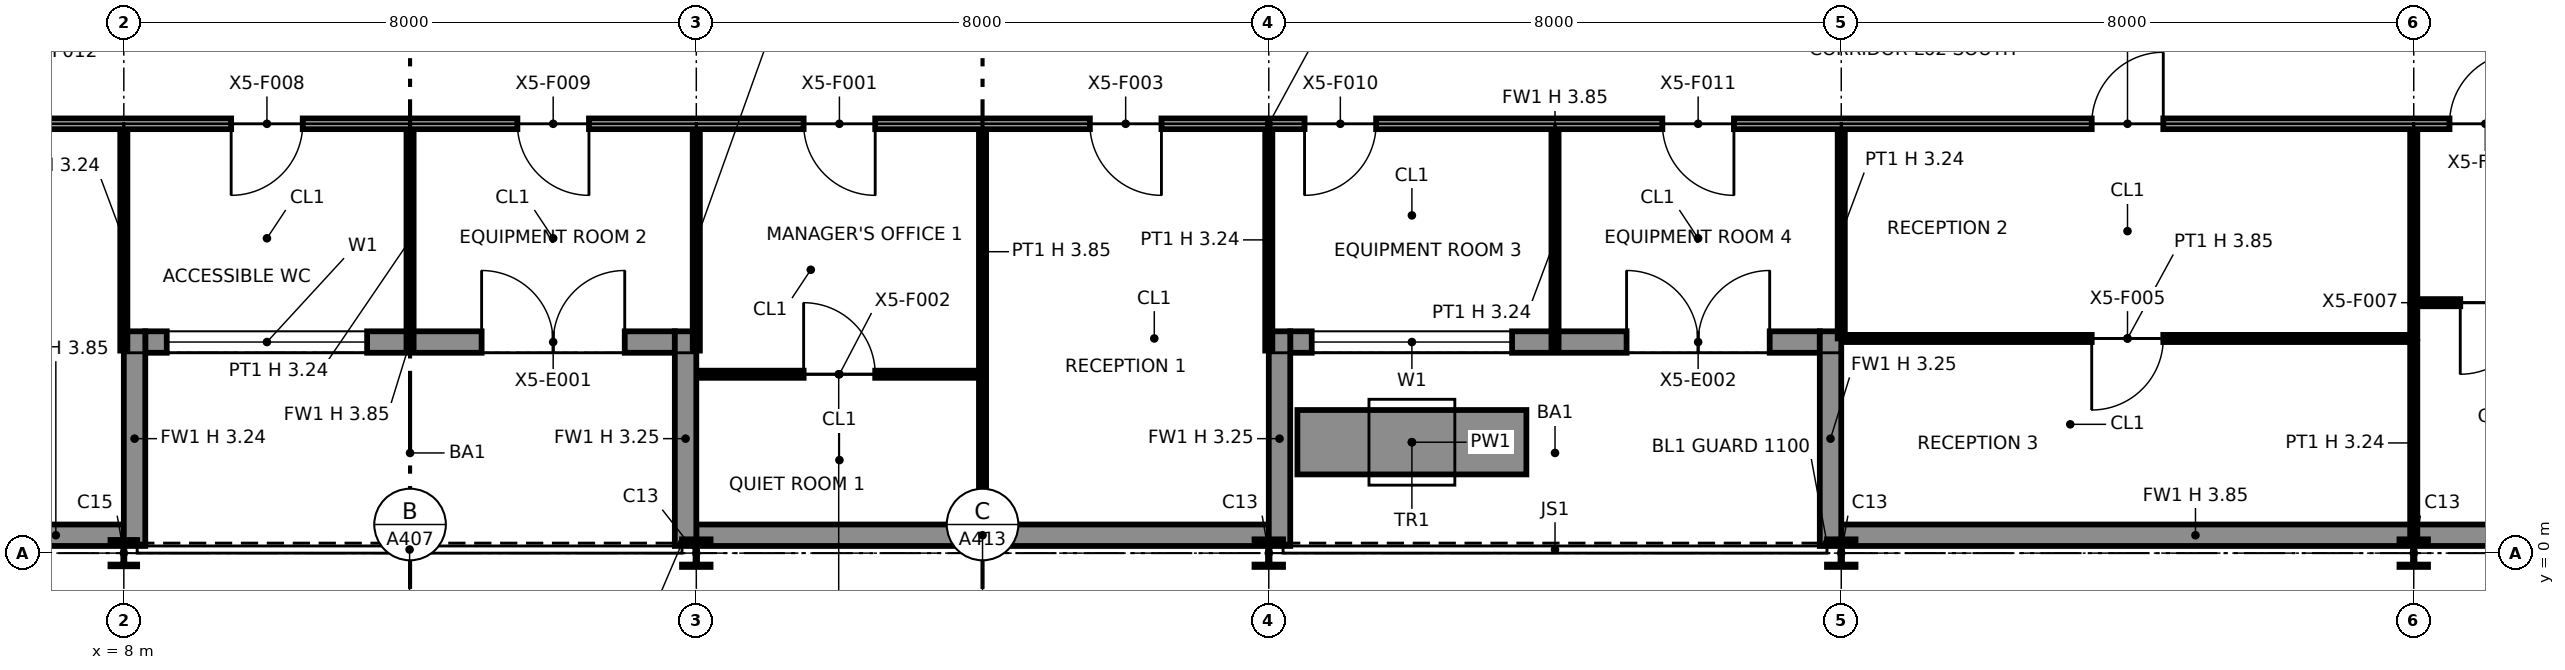
"""IFC4 building model, lengths in metres.
Left out: names, types, materials, properties, quantities, classifications, styles, units other than length and angle.
Written with IfcOpenShell. Run it as: python <this file> out.ifc"""

import sys

from ifc_helpers import new_model, si_unit, direction, frame, frame_2d, origin, origin_2d, place, context, subcontext, project, spatial, polyline, rectangle, i_section, outline, extrude, element, fill, save


model = new_model("IFC4")
c1 = context("Model", 3, precision=1e-05, world=origin(), true_north=direction((0.0, 1.0)))
c2 = subcontext(c1, "Body", "Model", "MODEL_VIEW")
j1 = project(units=[si_unit("LENGTHUNIT", "METRE"), si_unit("PLANEANGLEUNIT", "RADIAN")], contexts=[c1])
p1 = place(None, origin())
s1 = spatial("IfcSite", under=j1, at=p1, CompositionType="ELEMENT")
p2 = place(p1, origin())
s2 = spatial("IfcBuilding", under=s1, at=p2, CompositionType="ELEMENT")
p3 = place(p2, frame((0.0, 0.0, 283.0)))
s3 = spatial("IfcBuildingStorey", under=s2, at=p3, CompositionType="ELEMENT", Elevation=283.0)
p4 = place(p3, frame((8.0, 0.0, 0.0), z_axis=(0.0, 0.0, 1.0), x_axis=(1.0, 0.0, 0.0)))
e1 = element("IfcColumn", 1, at=p4, inside=s3, PredefinedType="COLUMN", context=c2, shape_type="SweptSolid", body=[
    extrude(i_section(OverallWidth=0.373, OverallDepth=0.368, WebThickness=0.015, FlangeThickness=0.024, at=origin_2d()), origin(), (0.0, 0.0, 1.0), 3.85),
])
for number, where, z_axis, x_axis in (
    (2, (16.0, 0.0, 0.0), (0.0, 0.0, 1.0), (1.0, 0.0, 0.0)),
    (3, (24.0, 0.0, 0.0), (0.0, 0.0, 1.0), (1.0, 0.0, 0.0)),
    (4, (32.0, 0.0, 0.0), (0.0, 0.0, 1.0), (1.0, 0.0, 0.0)),
    (5, (40.0, 0.0, 0.0), (0.0, 0.0, 1.0), (1.0, 0.0, 0.0)),
):
    element("IfcColumn", number, at=place(p3, frame(where, z_axis=z_axis, x_axis=x_axis)), inside=s3, PredefinedType="COLUMN", context=c2, shape_type="SweptSolid", body=[
        extrude(i_section(OverallWidth=0.399, OverallDepth=0.386, WebThickness=0.021, FlangeThickness=0.033, at=origin_2d()), origin(), (0.0, 0.0, 1.0), 3.85),
    ])
p5 = place(p3, frame((6.1, 0.25, 0.0), z_axis=(0.0, 0.0, 1.0), x_axis=(1.0, 0.0, 0.0)))
e6 = element("IfcWall", 6, at=p5, inside=s3, PredefinedType="SOLIDWALL", context=c2, shape_type="SweptSolid", body=[
    extrude(rectangle(XDim=1.9, YDim=0.3, at=frame_2d((0.95, 0.0))), origin(), (0.0, 0.0, 1.0), 3.85),
])
p6 = place(p3, frame((8.3, 2.95, 0.0), z_axis=(0.0, 0.0, 1.0), x_axis=(1.0, 0.0, 0.0)))
e7 = element("IfcWall", 7, at=p6, inside=s3, PredefinedType="SOLIDWALL", context=c2, shape_type="SweptSolid", body=[
    extrude(rectangle(XDim=7.4, YDim=0.3, at=frame_2d((3.7, 0.0))), origin(), (0.0, 0.0, 1.0), 3.85),
])
p7 = place(p6, frame((0.3, 0.0, 0.9)))
e8 = element("IfcOpeningElement", 8, at=p7, cuts=e7, PredefinedType="OPENING", context=c2, shape_type="SweptSolid", body=[
    extrude(rectangle(XDim=2.8, YDim=2.2, at=frame_2d((1.4, 1.1))), frame((0.0, 0.16, 0.0), z_axis=(0.0, -1.0, 0.0), x_axis=(1.0, 0.0, 0.0)), (0.0, 0.0, 1.0), 0.32),
])
p8 = place(p6, frame((4.7, 0.0, 0.0)))
e9 = element("IfcOpeningElement", 9, at=p8, cuts=e7, PredefinedType="OPENING", context=c2, shape_type="SweptSolid", body=[
    extrude(rectangle(XDim=2.0, YDim=2.4, at=frame_2d((1.0, 1.2))), frame((0.0, 0.16, 0.0), z_axis=(0.0, -1.0, 0.0), x_axis=(1.0, 0.0, 0.0)), (0.0, 0.0, 1.0), 0.32),
])
p9 = place(p3, frame((8.15, 0.1, 0.0), z_axis=(0.0, 0.0, 1.0), x_axis=(0.0, 1.0, 0.0)))
e10 = element("IfcWall", 10, at=p9, inside=s3, PredefinedType="SOLIDWALL", context=c2, shape_type="SweptSolid", body=[
    extrude(rectangle(XDim=3.0, YDim=0.3, at=frame_2d((1.5, 0.0))), origin(), (0.0, 0.0, 1.0), 3.237),
])
p10 = place(p3, frame((15.85, 0.1, 0.0), z_axis=(0.0, 0.0, 1.0), x_axis=(0.0, 1.0, 0.0)))
e11 = element("IfcWall", 11, at=p10, inside=s3, PredefinedType="SOLIDWALL", context=c2, shape_type="SweptSolid", body=[
    extrude(rectangle(XDim=3.0, YDim=0.3, at=frame_2d((1.5, 0.0))), origin(), (0.0, 0.0, 1.0), 3.247),
])
p11 = place(p3, frame((16.0, 0.25, 0.0), z_axis=(0.0, 0.0, 1.0), x_axis=(1.0, 0.0, 0.0)))
e12 = element("IfcWall", 12, at=p11, inside=s3, PredefinedType="SOLIDWALL", context=c2, shape_type="SweptSolid", body=[
    extrude(rectangle(XDim=8.0, YDim=0.3, at=frame_2d((4.0, 0.0))), origin(), (0.0, 0.0, 1.0), 3.85),
])
p12 = place(p3, frame((24.3, 2.95, 0.0), z_axis=(0.0, 0.0, 1.0), x_axis=(1.0, 0.0, 0.0)))
e13 = element("IfcWall", 13, at=p12, inside=s3, PredefinedType="SOLIDWALL", context=c2, shape_type="SweptSolid", body=[
    extrude(rectangle(XDim=7.4, YDim=0.3, at=frame_2d((3.7, 0.0))), origin(), (0.0, 0.0, 1.0), 3.85),
])
p13 = place(p12, frame((0.3, 0.0, 0.9)))
e14 = element("IfcOpeningElement", 14, at=p13, cuts=e13, PredefinedType="OPENING", context=c2, shape_type="SweptSolid", body=[
    extrude(rectangle(XDim=2.8, YDim=2.2, at=frame_2d((1.4, 1.1))), frame((0.0, 0.16, 0.0), z_axis=(0.0, -1.0, 0.0), x_axis=(1.0, 0.0, 0.0)), (0.0, 0.0, 1.0), 0.32),
])
p14 = place(p12, frame((4.7, 0.0, 0.0)))
e15 = element("IfcOpeningElement", 15, at=p14, cuts=e13, PredefinedType="OPENING", context=c2, shape_type="SweptSolid", body=[
    extrude(rectangle(XDim=2.0, YDim=2.4, at=frame_2d((1.0, 1.2))), frame((0.0, 0.16, 0.0), z_axis=(0.0, -1.0, 0.0), x_axis=(1.0, 0.0, 0.0)), (0.0, 0.0, 1.0), 0.32),
])
for number, where, z_axis, x_axis in (
    (16, (24.15, 0.1, 0.0), (0.0, 0.0, 1.0), (0.0, 1.0, 0.0)),
    (17, (31.85, 0.1, 0.0), (0.0, 0.0, 1.0), (0.0, 1.0, 0.0)),
):
    element("IfcWall", number, at=place(p3, frame(where, z_axis=z_axis, x_axis=x_axis)), inside=s3, PredefinedType="SOLIDWALL", context=c2, shape_type="SweptSolid", body=[
        extrude(rectangle(XDim=3.0, YDim=0.3, at=frame_2d((1.5, 0.0))), origin(), (0.0, 0.0, 1.0), 3.247),
    ])
p15 = place(p3, frame((32.0, 0.25, 0.0), z_axis=(0.0, 0.0, 1.0), x_axis=(1.0, 0.0, 0.0)))
e18 = element("IfcWall", 18, at=p15, inside=s3, PredefinedType="SOLIDWALL", context=c2, shape_type="SweptSolid", body=[
    extrude(rectangle(XDim=9.9, YDim=0.3, at=frame_2d((4.95, 0.0))), origin(), (0.0, 0.0, 1.0), 3.85),
])
p16 = place(p3, frame((24.4, 1.55, 0.0), z_axis=(0.0, 0.0, 1.0), x_axis=(1.0, 0.0, 0.0)))
e19 = element("IfcWall", 19, at=p16, inside=s3, PredefinedType="SOLIDWALL", context=c2, shape_type="SweptSolid", body=[
    extrude(rectangle(XDim=3.2, YDim=0.9, at=frame_2d((1.6, 0.0))), origin(), (0.0, 0.0, 1.0), 0.6),
])
p17 = place(p3, frame((20.0, 0.13, 0.0), z_axis=(0.0, 0.0, 1.0), x_axis=(0.0, 1.0, 0.0)))
e20 = element("IfcWall", 20, at=p17, inside=s3, PredefinedType="PARTITIONING", context=c2, shape_type="SweptSolid", body=[
    extrude(rectangle(XDim=2.32, YDim=0.1, at=frame_2d((1.16, 0.0))), origin(), (0.0, 0.0, 1.0), 3.85),
])
p18 = place(p3, frame((40.0, 0.13, 0.0), z_axis=(0.0, 0.0, 1.0), x_axis=(0.0, 1.0, 0.0)))
e21 = element("IfcWall", 21, at=p18, inside=s3, PredefinedType="PARTITIONING", context=c2, shape_type="SweptSolid", body=[
    extrude(rectangle(XDim=2.82, YDim=0.1, at=frame_2d((1.41, 0.0))), origin(), (0.0, 0.0, 1.0), 3.238),
])
p19 = place(p3, frame((16.03, 2.5, 0.0), z_axis=(0.0, 0.0, 1.0), x_axis=(1.0, 0.0, 0.0)))
e22 = element("IfcWall", 22, at=p19, inside=s3, PredefinedType="PARTITIONING", context=c2, shape_type="SweptSolid", body=[
    extrude(rectangle(XDim=3.92, YDim=0.1, at=frame_2d((1.96, 0.0))), origin(), (0.0, 0.0, 1.0), 3.85),
])
p20 = place(p19, frame((1.47, 0.0, 0.0)))
e23 = element("IfcOpeningElement", 23, at=p20, cuts=e22, PredefinedType="OPENING", context=c2, shape_type="SweptSolid", body=[
    extrude(rectangle(XDim=1.0, YDim=2.1, at=frame_2d((0.5, 1.05))), frame((0.0, 0.06, 0.0), z_axis=(0.0, -1.0, 0.0), x_axis=(1.0, 0.0, 0.0)), (0.0, 0.0, 1.0), 0.12),
])
p21 = place(p3, frame((20.0, 2.5, 0.0), z_axis=(0.0, 0.0, 1.0), x_axis=(0.0, 1.0, 0.0)))
e24 = element("IfcWall", 24, at=p21, inside=s3, PredefinedType="PARTITIONING", context=c2, shape_type="SweptSolid", body=[
    extrude(outline(polyline([(0.0, 0.0), (3.425, 0.0), (3.425, 3.85), (1.8, 3.85), (1.798, 3.238), (1.202, 3.238), (1.2, 3.85), (0.0, 3.85), (0.0, 0.0)])), frame((0.0, 0.05, 0.0), z_axis=(0.0, -1.0, 0.0), x_axis=(1.0, 0.0, 0.0)), (0.0, 0.0, 1.0), 0.1),
])
for number, where, z_axis, x_axis in (
    (25, (8.0, 2.83, 0.0), (0.0, 0.0, 1.0), (0.0, 1.0, 0.0)),
    (26, (12.0, 2.83, 0.0), (0.0, 0.0, 1.0), (0.0, 1.0, 0.0)),
    (27, (16.0, 2.83, 0.0), (0.0, 0.0, 1.0), (0.0, 1.0, 0.0)),
    (28, (24.0, 2.83, 0.0), (0.0, 0.0, 1.0), (0.0, 1.0, 0.0)),
    (29, (28.0, 2.83, 0.0), (0.0, 0.0, 1.0), (0.0, 1.0, 0.0)),
):
    element("IfcWall", number, at=place(p3, frame(where, z_axis=z_axis, x_axis=x_axis)), inside=s3, PredefinedType="PARTITIONING", context=c2, shape_type="SweptSolid", body=[
        extrude(rectangle(XDim=3.095, YDim=0.1, at=frame_2d((1.547, 0.0))), origin(), (0.0, 0.0, 1.0), 3.238),
    ])
p22 = place(p3, frame((32.05, 3.0, 0.0), z_axis=(0.0, 0.0, 1.0), x_axis=(1.0, 0.0, 0.0)))
e30 = element("IfcWall", 30, at=p22, inside=s3, PredefinedType="PARTITIONING", context=c2, shape_type="SweptSolid", body=[
    extrude(rectangle(XDim=7.9, YDim=0.1, at=frame_2d((3.95, 0.0))), origin(), (0.0, 0.0, 1.0), 3.85),
])
p23 = place(p22, frame((4.45, 0.0, 0.0), z_axis=(0.0, 0.0, 1.0), x_axis=(-1.0, 0.0, 0.0)))
e31 = element("IfcOpeningElement", 31, at=p23, cuts=e30, PredefinedType="OPENING", context=c2, shape_type="SweptSolid", body=[
    extrude(rectangle(XDim=1.0, YDim=2.1, at=frame_2d((0.5, 1.05))), frame((0.0, 0.06, 0.0), z_axis=(0.0, -1.0, 0.0), x_axis=(1.0, 0.0, 0.0)), (0.0, 0.0, 1.0), 0.12),
])
p24 = place(p3, frame((32.0, 3.0, 0.0), z_axis=(0.0, 0.0, 1.0), x_axis=(0.0, 1.0, 0.0)))
e32 = element("IfcWall", 32, at=p24, inside=s3, PredefinedType="PARTITIONING", context=c2, shape_type="SweptSolid", body=[
    extrude(rectangle(XDim=2.925, YDim=0.1, at=frame_2d((1.462, 0.0))), origin(), (0.0, 0.0, 1.0), 3.238),
])
p25 = place(p3, frame((40.0, 3.0, 0.0), z_axis=(0.0, 0.0, 1.0), x_axis=(0.0, 1.0, 0.0)))
e33 = element("IfcWall", 33, at=p25, inside=s3, PredefinedType="PARTITIONING", context=c2, shape_type="SweptSolid", body=[
    extrude(rectangle(XDim=0.45, YDim=0.1, at=frame_2d((0.225, 0.0))), origin(), (0.0, 0.0, 1.0), 3.238),
])
p26 = place(p3, frame((40.05, 3.5, 0.0), z_axis=(0.0, 0.0, 1.0), x_axis=(1.0, 0.0, 0.0)))
e34 = element("IfcWall", 34, at=p26, inside=s3, PredefinedType="PARTITIONING", context=c2, shape_type="SweptSolid", body=[
    extrude(rectangle(XDim=3.52, YDim=0.1, at=frame_2d((1.76, 0.0))), origin(), (0.0, 0.0, 1.0), 3.85),
])
p27 = place(p26, frame((1.6, 0.0, 0.0), z_axis=(0.0, 0.0, 1.0), x_axis=(-1.0, 0.0, 0.0)))
e35 = element("IfcOpeningElement", 35, at=p27, cuts=e34, PredefinedType="OPENING", context=c2, shape_type="SweptSolid", body=[
    extrude(rectangle(XDim=1.0, YDim=2.1, at=frame_2d((0.5, 1.05))), frame((0.0, 0.06, 0.0), z_axis=(0.0, -1.0, 0.0), x_axis=(1.0, 0.0, 0.0)), (0.0, 0.0, 1.0), 0.12),
])
p28 = place(p3, frame((40.0, 3.5, 0.0), z_axis=(0.0, 0.0, 1.0), x_axis=(0.0, 1.0, 0.0)))
e36 = element("IfcWall", 36, at=p28, inside=s3, PredefinedType="PARTITIONING", context=c2, shape_type="SweptSolid", body=[
    extrude(rectangle(XDim=2.425, YDim=0.1, at=frame_2d((1.212, 0.0))), origin(), (0.0, 0.0, 1.0), 3.238),
])
p29 = place(p3, frame((6.075, 6.0, 0.0), z_axis=(0.0, 0.0, 1.0), x_axis=(1.0, 0.0, 0.0)))
e37 = element("IfcWall", 37, at=p29, inside=s3, PredefinedType="PARTITIONING", context=c2, shape_type="SweptSolid", body=[
    extrude(rectangle(XDim=35.85, YDim=0.15, at=frame_2d((17.925, 0.0))), origin(), (0.0, 0.0, 1.0), 3.85),
])
p30 = place(p29, frame((12.425, 0.0, 0.0), z_axis=(0.0, 0.0, 1.0), x_axis=(-1.0, 0.0, 0.0)))
e38 = element("IfcOpeningElement", 38, at=p30, cuts=e37, PredefinedType="OPENING", context=c2, shape_type="SweptSolid", body=[
    extrude(rectangle(XDim=1.0, YDim=2.1, at=frame_2d((0.5, 1.05))), frame((0.0, 0.085, 0.0), z_axis=(0.0, -1.0, 0.0), x_axis=(1.0, 0.0, 0.0)), (0.0, 0.0, 1.0), 0.17),
])
p31 = place(p29, frame((16.425, 0.0, 0.0), z_axis=(0.0, 0.0, 1.0), x_axis=(-1.0, 0.0, 0.0)))
e39 = element("IfcOpeningElement", 39, at=p31, cuts=e37, PredefinedType="OPENING", context=c2, shape_type="SweptSolid", body=[
    extrude(rectangle(XDim=1.0, YDim=2.1, at=frame_2d((0.5, 1.05))), frame((0.0, 0.085, 0.0), z_axis=(0.0, -1.0, 0.0), x_axis=(1.0, 0.0, 0.0)), (0.0, 0.0, 1.0), 0.17),
])
p32 = place(p29, frame((29.425, 0.0, 0.0)))
e40 = element("IfcOpeningElement", 40, at=p32, cuts=e37, PredefinedType="OPENING", context=c2, shape_type="SweptSolid", body=[
    extrude(rectangle(XDim=1.0, YDim=2.1, at=frame_2d((0.5, 1.05))), frame((0.0, 0.085, 0.0), z_axis=(0.0, -1.0, 0.0), x_axis=(1.0, 0.0, 0.0)), (0.0, 0.0, 1.0), 0.17),
])
p33 = place(p29, frame((34.425, 0.0, 0.0)))
e41 = element("IfcOpeningElement", 41, at=p33, cuts=e37, PredefinedType="OPENING", context=c2, shape_type="SweptSolid", body=[
    extrude(rectangle(XDim=1.0, YDim=2.1, at=frame_2d((0.5, 1.05))), frame((0.0, 0.085, 0.0), z_axis=(0.0, -1.0, 0.0), x_axis=(1.0, 0.0, 0.0)), (0.0, 0.0, 1.0), 0.17),
])
p34 = place(p29, frame((4.425, 0.0, 0.0), z_axis=(0.0, 0.0, 1.0), x_axis=(-1.0, 0.0, 0.0)))
e42 = element("IfcOpeningElement", 42, at=p34, cuts=e37, PredefinedType="OPENING", context=c2, shape_type="SweptSolid", body=[
    extrude(rectangle(XDim=1.0, YDim=2.1, at=frame_2d((0.5, 1.05))), frame((0.0, 0.085, 0.0), z_axis=(0.0, -1.0, 0.0), x_axis=(1.0, 0.0, 0.0)), (0.0, 0.0, 1.0), 0.17),
])
p35 = place(p29, frame((8.425, 0.0, 0.0), z_axis=(0.0, 0.0, 1.0), x_axis=(-1.0, 0.0, 0.0)))
e43 = element("IfcOpeningElement", 43, at=p35, cuts=e37, PredefinedType="OPENING", context=c2, shape_type="SweptSolid", body=[
    extrude(rectangle(XDim=1.0, YDim=2.1, at=frame_2d((0.5, 1.05))), frame((0.0, 0.085, 0.0), z_axis=(0.0, -1.0, 0.0), x_axis=(1.0, 0.0, 0.0)), (0.0, 0.0, 1.0), 0.17),
])
p36 = place(p29, frame((19.425, 0.0, 0.0), z_axis=(0.0, 0.0, 1.0), x_axis=(-1.0, 0.0, 0.0)))
e44 = element("IfcOpeningElement", 44, at=p36, cuts=e37, PredefinedType="OPENING", context=c2, shape_type="SweptSolid", body=[
    extrude(rectangle(XDim=1.0, YDim=2.1, at=frame_2d((0.5, 1.05))), frame((0.0, 0.085, 0.0), z_axis=(0.0, -1.0, 0.0), x_axis=(1.0, 0.0, 0.0)), (0.0, 0.0, 1.0), 0.17),
])
p37 = place(p29, frame((24.425, 0.0, 0.0), z_axis=(0.0, 0.0, 1.0), x_axis=(-1.0, 0.0, 0.0)))
e45 = element("IfcOpeningElement", 45, at=p37, cuts=e37, PredefinedType="OPENING", context=c2, shape_type="SweptSolid", body=[
    extrude(rectangle(XDim=1.0, YDim=2.1, at=frame_2d((0.5, 1.05))), frame((0.0, 0.085, 0.0), z_axis=(0.0, -1.0, 0.0), x_axis=(1.0, 0.0, 0.0)), (0.0, 0.0, 1.0), 0.17),
])
p38 = place(p7, origin())
e46 = element("IfcWindow", 46, at=p38, inside=s3, PartitioningType="SINGLE_PANEL", PredefinedType="WINDOW", context=c2, shape_type="SweptSolid", body=[
    extrude(rectangle(XDim=2.8, YDim=2.2, at=frame_2d((1.4, 1.1))), frame((0.0, 0.03, 0.0), z_axis=(0.0, -1.0, 0.0), x_axis=(1.0, 0.0, 0.0)), (0.0, 0.0, 1.0), 0.06),
])
fill(e8, e46)
p39 = place(p8, origin())
e47 = element("IfcDoor", 47, at=p39, inside=s3, OperationType="DOUBLE_DOOR_SINGLE_SWING", PredefinedType="DOOR", context=c2, shape_type="SweptSolid", body=[
    extrude(rectangle(XDim=2.0, YDim=2.4, at=frame_2d((1.0, 1.2))), frame((0.0, 0.025, 0.0), z_axis=(0.0, -1.0, 0.0), x_axis=(1.0, 0.0, 0.0)), (0.0, 0.0, 1.0), 0.05),
])
fill(e9, e47)
p40 = place(p13, origin())
e48 = element("IfcWindow", 48, at=p40, inside=s3, PartitioningType="SINGLE_PANEL", PredefinedType="WINDOW", context=c2, shape_type="SweptSolid", body=[
    extrude(rectangle(XDim=2.8, YDim=2.2, at=frame_2d((1.4, 1.1))), frame((0.0, 0.03, 0.0), z_axis=(0.0, -1.0, 0.0), x_axis=(1.0, 0.0, 0.0)), (0.0, 0.0, 1.0), 0.06),
])
fill(e14, e48)
p41 = place(p14, origin())
e49 = element("IfcDoor", 49, at=p41, inside=s3, OperationType="DOUBLE_DOOR_SINGLE_SWING", PredefinedType="DOOR", context=c2, shape_type="SweptSolid", body=[
    extrude(rectangle(XDim=2.0, YDim=2.4, at=frame_2d((1.0, 1.2))), frame((0.0, 0.025, 0.0), z_axis=(0.0, -1.0, 0.0), x_axis=(1.0, 0.0, 0.0)), (0.0, 0.0, 1.0), 0.05),
])
fill(e15, e49)
p42 = place(p30, origin())
e50 = element("IfcDoor", 50, at=p42, inside=s3, OperationType="SINGLE_SWING_LEFT", PredefinedType="DOOR", context=c2, shape_type="SweptSolid", body=[
    extrude(rectangle(XDim=1.0, YDim=2.1, at=frame_2d((0.5, 1.05))), frame((0.0, 0.025, 0.0), z_axis=(0.0, -1.0, 0.0), x_axis=(1.0, 0.0, 0.0)), (0.0, 0.0, 1.0), 0.05),
])
fill(e38, e50)
p43 = place(p20, origin())
e51 = element("IfcDoor", 51, at=p43, inside=s3, OperationType="SINGLE_SWING_LEFT", PredefinedType="DOOR", context=c2, shape_type="SweptSolid", body=[
    extrude(rectangle(XDim=1.0, YDim=2.1, at=frame_2d((0.5, 1.05))), frame((0.0, 0.025, 0.0), z_axis=(0.0, -1.0, 0.0), x_axis=(1.0, 0.0, 0.0)), (0.0, 0.0, 1.0), 0.05),
])
fill(e23, e51)
p44 = place(p31, origin())
e52 = element("IfcDoor", 52, at=p44, inside=s3, OperationType="SINGLE_SWING_LEFT", PredefinedType="DOOR", context=c2, shape_type="SweptSolid", body=[
    extrude(rectangle(XDim=1.0, YDim=2.1, at=frame_2d((0.5, 1.05))), frame((0.0, 0.025, 0.0), z_axis=(0.0, -1.0, 0.0), x_axis=(1.0, 0.0, 0.0)), (0.0, 0.0, 1.0), 0.05),
])
fill(e39, e52)
p45 = place(p32, origin())
e53 = element("IfcDoor", 53, at=p45, inside=s3, OperationType="SINGLE_SWING_RIGHT", PredefinedType="DOOR", context=c2, shape_type="SweptSolid", body=[
    extrude(rectangle(XDim=1.0, YDim=2.1, at=frame_2d((0.5, 1.05))), frame((0.0, 0.025, 0.0), z_axis=(0.0, -1.0, 0.0), x_axis=(1.0, 0.0, 0.0)), (0.0, 0.0, 1.0), 0.05),
])
fill(e40, e53)
p46 = place(p23, origin())
e54 = element("IfcDoor", 54, at=p46, inside=s3, OperationType="SINGLE_SWING_RIGHT", PredefinedType="DOOR", context=c2, shape_type="SweptSolid", body=[
    extrude(rectangle(XDim=1.0, YDim=2.1, at=frame_2d((0.5, 1.05))), frame((0.0, 0.025, 0.0), z_axis=(0.0, -1.0, 0.0), x_axis=(1.0, 0.0, 0.0)), (0.0, 0.0, 1.0), 0.05),
])
fill(e31, e54)
p47 = place(p33, origin())
e55 = element("IfcDoor", 55, at=p47, inside=s3, OperationType="SINGLE_SWING_RIGHT", PredefinedType="DOOR", context=c2, shape_type="SweptSolid", body=[
    extrude(rectangle(XDim=1.0, YDim=2.1, at=frame_2d((0.5, 1.05))), frame((0.0, 0.025, 0.0), z_axis=(0.0, -1.0, 0.0), x_axis=(1.0, 0.0, 0.0)), (0.0, 0.0, 1.0), 0.05),
])
fill(e41, e55)
p48 = place(p27, origin())
e56 = element("IfcDoor", 56, at=p48, inside=s3, OperationType="SINGLE_SWING_RIGHT", PredefinedType="DOOR", context=c2, shape_type="SweptSolid", body=[
    extrude(rectangle(XDim=1.0, YDim=2.1, at=frame_2d((0.5, 1.05))), frame((0.0, 0.025, 0.0), z_axis=(0.0, -1.0, 0.0), x_axis=(1.0, 0.0, 0.0)), (0.0, 0.0, 1.0), 0.05),
])
fill(e35, e56)
p49 = place(p34, origin())
e57 = element("IfcDoor", 57, at=p49, inside=s3, OperationType="SINGLE_SWING_RIGHT", PredefinedType="DOOR", context=c2, shape_type="SweptSolid", body=[
    extrude(rectangle(XDim=1.0, YDim=2.1, at=frame_2d((0.5, 1.05))), frame((0.0, 0.025, 0.0), z_axis=(0.0, -1.0, 0.0), x_axis=(1.0, 0.0, 0.0)), (0.0, 0.0, 1.0), 0.05),
])
fill(e42, e57)
p50 = place(p35, origin())
e58 = element("IfcDoor", 58, at=p50, inside=s3, OperationType="SINGLE_SWING_LEFT", PredefinedType="DOOR", context=c2, shape_type="SweptSolid", body=[
    extrude(rectangle(XDim=1.0, YDim=2.1, at=frame_2d((0.5, 1.05))), frame((0.0, 0.025, 0.0), z_axis=(0.0, -1.0, 0.0), x_axis=(1.0, 0.0, 0.0)), (0.0, 0.0, 1.0), 0.05),
])
fill(e43, e58)
p51 = place(p36, origin())
e59 = element("IfcDoor", 59, at=p51, inside=s3, OperationType="SINGLE_SWING_RIGHT", PredefinedType="DOOR", context=c2, shape_type="SweptSolid", body=[
    extrude(rectangle(XDim=1.0, YDim=2.1, at=frame_2d((0.5, 1.05))), frame((0.0, 0.025, 0.0), z_axis=(0.0, -1.0, 0.0), x_axis=(1.0, 0.0, 0.0)), (0.0, 0.0, 1.0), 0.05),
])
fill(e44, e59)
p52 = place(p37, origin())
e60 = element("IfcDoor", 60, at=p52, inside=s3, OperationType="SINGLE_SWING_LEFT", PredefinedType="DOOR", context=c2, shape_type="SweptSolid", body=[
    extrude(rectangle(XDim=1.0, YDim=2.1, at=frame_2d((0.5, 1.05))), frame((0.0, 0.025, 0.0), z_axis=(0.0, -1.0, 0.0), x_axis=(1.0, 0.0, 0.0)), (0.0, 0.0, 1.0), 0.05),
])
fill(e45, e60)
save(model, sys.argv[1])
